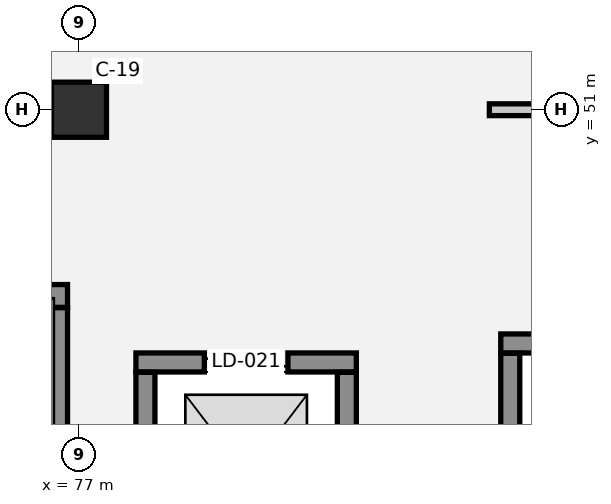
"""IFC4 building model, lengths in metres.
Left out: names, types, materials, properties, quantities, classifications, styles, units other than length and angle.
Written with IfcOpenShell. Run it as: python <this file> out.ifc"""

import sys

from ifc_helpers import new_model, si_unit, direction, frame, frame_2d, origin, origin_2d, place, context, subcontext, project, spatial, rectangle, extrude, element, fill, save


model = new_model("IFC4")
c1 = context("Model", 3, precision=1e-05, world=origin(), true_north=direction((0.0, 1.0)))
c2 = subcontext(c1, "Body", "Model", "MODEL_VIEW")
j1 = project(units=[si_unit("LENGTHUNIT", "METRE"), si_unit("PLANEANGLEUNIT", "RADIAN")], contexts=[c1])
p1 = place(None, origin())
s1 = spatial("IfcSite", under=j1, at=p1, CompositionType="ELEMENT")
p2 = place(p1, origin())
s2 = spatial("IfcBuilding", under=s1, at=p2, CompositionType="ELEMENT")
p3 = place(p2, frame((0.0, 0.0, 14.4)))
s3 = spatial("IfcBuildingStorey", under=s2, at=p3, CompositionType="ELEMENT", Elevation=14.4)
p4 = place(p3, frame((77.0, 51.0, 0.0), z_axis=(0.0, 0.0, 1.0), x_axis=(1.0, 0.0, 0.0)))
e1 = element("IfcColumn", 1, at=p4, inside=s3, PredefinedType="COLUMN", context=c2, shape_type="SweptSolid", body=[
    extrude(rectangle(XDim=0.725, YDim=0.725, at=origin_2d()), origin(), (0.0, 0.0, 1.0), 3.9),
])
p5 = place(p3, frame((80.65, 47.675, 0.0), z_axis=(0.0, 0.0, 1.0), x_axis=(-1.0, 0.0, 0.0)))
e2 = element("IfcWall", 2, at=p5, inside=s3, PredefinedType="SHEAR", context=c2, shape_type="SweptSolid", body=[
    extrude(rectangle(XDim=2.9, YDim=0.25, at=frame_2d((1.45, 0.0))), origin(), (0.0, 0.0, 1.0), 3.9),
])
p6 = place(p5, frame((0.9, 0.0, 0.0)))
e3 = element("IfcOpeningElement", 3, at=p6, cuts=e2, PredefinedType="OPENING", context=c2, shape_type="SweptSolid", body=[
    extrude(rectangle(XDim=1.1, YDim=2.15, at=frame_2d((0.55, 1.075))), frame((0.0, 0.135, 0.0), z_axis=(0.0, -1.0, 0.0), x_axis=(1.0, 0.0, 0.0)), (0.0, 0.0, 1.0), 0.27),
])
for number, where, z_axis, x_axis in (
    (4, (77.875, 47.545, 0.0), (0.0, 0.0, 1.0), (0.0, -1.0, 0.0)),
    (5, (80.525, 44.855, 0.0), (0.0, 0.0, 1.0), (0.0, 1.0, 0.0)),
):
    element("IfcWall", number, at=place(p3, frame(where, z_axis=z_axis, x_axis=x_axis)), inside=s3, PredefinedType="SHEAR", context=c2, shape_type="SweptSolid", body=[
        extrude(rectangle(XDim=2.69, YDim=0.25, at=frame_2d((1.345, 0.0))), origin(), (0.0, 0.0, 1.0), 3.9),
    ])
p7 = place(p3, frame((85.45, 47.925, 0.0), z_axis=(0.0, 0.0, 1.0), x_axis=(-1.0, 0.0, 0.0)))
e6 = element("IfcWall", 6, at=p7, inside=s3, PredefinedType="SHEAR", context=c2, shape_type="SweptSolid", body=[
    extrude(rectangle(XDim=2.9, YDim=0.25, at=frame_2d((1.45, 0.0))), origin(), (0.0, 0.0, 1.0), 3.9),
])
p8 = place(p3, frame((82.675, 47.795, 0.0), z_axis=(0.0, 0.0, 1.0), x_axis=(0.0, -1.0, 0.0)))
e7 = element("IfcWall", 7, at=p8, inside=s3, PredefinedType="SHEAR", context=c2, shape_type="SweptSolid", body=[
    extrude(rectangle(XDim=2.79, YDim=0.25, at=frame_2d((1.395, 0.0))), origin(), (0.0, 0.0, 1.0), 3.9),
])
p9 = place(p3, frame((76.85, 48.55, 0.0), z_axis=(0.0, 0.0, 1.0), x_axis=(-1.0, 0.0, 0.0)))
e8 = element("IfcWall", 8, at=p9, inside=s3, PredefinedType="SHEAR", context=c2, shape_type="SweptSolid", body=[
    extrude(rectangle(XDim=7.7, YDim=0.3, at=frame_2d((3.85, 0.0))), origin(), (0.0, 0.0, 1.0), 3.62),
])
p10 = place(p9, frame((6.025, 0.0, 0.0)))
e9 = element("IfcOpeningElement", 9, at=p10, cuts=e8, PredefinedType="OPENING", context=c2, shape_type="SweptSolid", body=[
    extrude(rectangle(XDim=1.25, YDim=2.15, at=frame_2d((0.625, 1.075))), frame((0.0, 0.16, 0.0), z_axis=(0.0, -1.0, 0.0), x_axis=(1.0, 0.0, 0.0)), (0.0, 0.0, 1.0), 0.32),
])
p11 = place(p3, frame((76.7, 44.195, 0.0), z_axis=(0.0, 0.0, 1.0), x_axis=(0.0, 1.0, 0.0)))
e10 = element("IfcWall", 10, at=p11, inside=s3, PredefinedType="SHEAR", context=c2, shape_type="SweptSolid", body=[
    extrude(rectangle(XDim=4.2, YDim=0.3, at=frame_2d((2.1, 0.0))), origin(), (0.0, 0.0, 1.0), 3.62),
])
p12 = place(p3, frame((75.6, 51.0, 0.0), z_axis=(0.0, 0.0, 1.0), x_axis=(1.0, 0.0, 0.0)))
e11 = element("IfcWall", 11, at=p12, inside=s3, PredefinedType="PARTITIONING", context=c2, shape_type="SweptSolid", body=[
    extrude(rectangle(XDim=1.6, YDim=0.155, at=frame_2d((0.8, 0.0))), origin(), (0.0, 0.0, 1.0), 2.93),
])
p13 = place(p3, frame((82.4, 51.0, 0.0), z_axis=(0.0, 0.0, 1.0), x_axis=(1.0, 0.0, 0.0)))
e12 = element("IfcWall", 12, at=p13, inside=s3, PredefinedType="PARTITIONING", context=c2, shape_type="SweptSolid", body=[
    extrude(rectangle(XDim=6.56, YDim=0.155, at=frame_2d((3.28, 0.0))), origin(), (0.0, 0.0, 1.0), 2.93),
])
p14 = place(p6, origin())
e13 = element("IfcDoor", 13, at=p14, inside=s3, OperationType="DOUBLE_DOOR_SLIDING", PredefinedType="DOOR", context=c2, shape_type="SweptSolid", body=[
    extrude(rectangle(XDim=1.1, YDim=2.15, at=frame_2d((0.55, 1.075))), frame((0.0, 0.025, 0.0), z_axis=(0.0, -1.0, 0.0), x_axis=(1.0, 0.0, 0.0)), (0.0, 0.0, 1.0), 0.05),
])
fill(e3, e13)
save(model, sys.argv[1])
